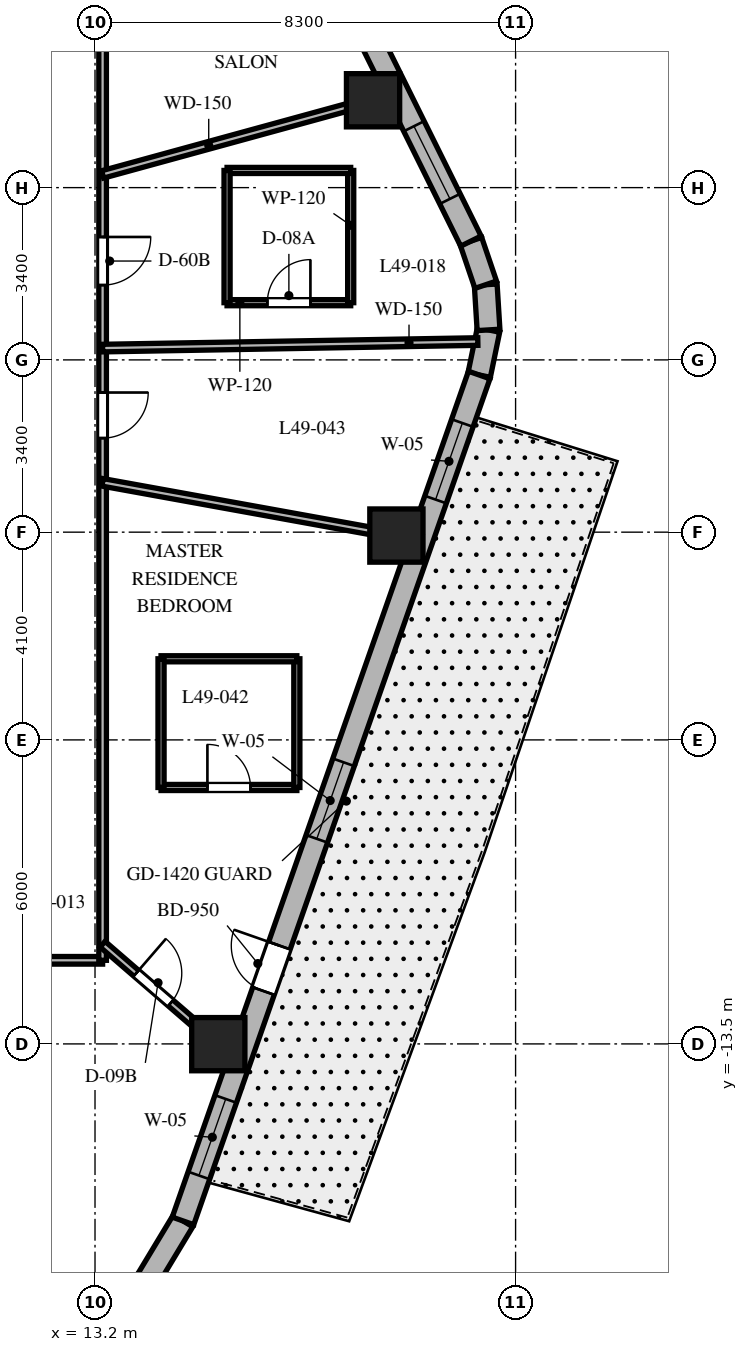
"""IFC4 building model, lengths in metres.
Left out: names, types, materials, properties, quantities, classifications, styles, units other than length and angle.
Written with IfcOpenShell. Run it as: python <this file> out.ifc"""

import sys

from ifc_helpers import new_model, si_unit, direction, frame, frame_2d, origin, origin_2d, place, context, subcontext, project, spatial, rectangle, extrude, element, fill, save


model = new_model("IFC4")
c1 = context("Model", 3, precision=1e-05, world=origin(), true_north=direction((0.0, 1.0)))
c2 = subcontext(c1, "Body", "Model", "MODEL_VIEW")
j1 = project(units=[si_unit("LENGTHUNIT", "METRE"), si_unit("PLANEANGLEUNIT", "RADIAN")], contexts=[c1])
p1 = place(None, origin())
s1 = spatial("IfcSite", under=j1, at=p1, CompositionType="ELEMENT")
p2 = place(p1, origin())
s2 = spatial("IfcBuilding", under=s1, at=p2, CompositionType="ELEMENT")
p3 = place(p2, frame((0.0, 0.0, 197.8)))
s3 = spatial("IfcBuildingStorey", under=s2, at=p3, CompositionType="ELEMENT", Elevation=197.8)
for number, where, z_axis, x_axis in (
    (1, (15.633, -13.505, 0.0), (0.0, 0.0, 1.0), (1.0, 0.0, 0.0)),
    (2, (19.148, -3.467, 0.0), (0.0, 0.0, 1.0), (1.0, 0.0, 0.0)),
    (3, (18.687, 5.124, 0.0), (0.0, 0.0, 1.0), (1.0, 0.0, 0.0)),
):
    element("IfcColumn", number, at=place(p3, frame(where, z_axis=z_axis, x_axis=x_axis)), inside=s3, PredefinedType="COLUMN", context=c2, shape_type="SweptSolid", body=[
        extrude(rectangle(XDim=1.05, YDim=1.05, at=origin_2d()), origin(), (0.0, 0.0, 1.0), 3.7),
    ])
p4 = place(p3, frame((14.214, -18.192, 0.0), z_axis=(0.0, 0.0, 1.0), x_axis=(0.516340945502, 0.856383108193, 0.0)))
e4 = element("IfcWall", 4, at=p4, inside=s3, PredefinedType="SOLIDWALL", context=c2, shape_type="SweptSolid", body=[
    extrude(rectangle(XDim=1.4, YDim=0.45, at=frame_2d((0.7, 0.0))), origin(), (0.0, 0.0, 1.0), 3.35),
])
p5 = place(p3, frame((20.782, -0.298, 0.0), z_axis=(0.0, 0.0, 1.0), x_axis=(0.202570068411, 0.979267771033, 0.0)))
e5 = element("IfcWall", 5, at=p5, inside=s3, PredefinedType="SOLIDWALL", context=c2, shape_type="SweptSolid", body=[
    extrude(rectangle(XDim=0.909, YDim=0.45, at=frame_2d((0.454, 0.0))), origin(), (0.0, 0.0, 1.0), 3.35),
])
p6 = place(p3, frame((20.966, 0.592, 0.0), z_axis=(0.0, 0.0, 1.0), x_axis=(-0.061748898935, 0.998091715966, 0.0)))
e6 = element("IfcWall", 6, at=p6, inside=s3, PredefinedType="SOLIDWALL", context=c2, shape_type="SweptSolid", body=[
    extrude(rectangle(XDim=0.894, YDim=0.45, at=frame_2d((0.447, 0.0))), origin(), (0.0, 0.0, 1.0), 3.35),
])
p7 = place(p3, frame((20.911, 1.484, 0.0), z_axis=(0.0, 0.0, 1.0), x_axis=(-0.321623334353, 0.946867694453, 0.0)))
e7 = element("IfcWall", 7, at=p7, inside=s3, PredefinedType="SOLIDWALL", context=c2, shape_type="SweptSolid", body=[
    extrude(rectangle(XDim=0.909, YDim=0.45, at=frame_2d((0.454, 0.0))), origin(), (0.0, 0.0, 1.0), 3.35),
])
p8 = place(p3, frame((14.937, -16.993, 0.0), z_axis=(0.0, 0.0, 1.0), x_axis=(0.330431575061, 0.943829949834, 0.0)))
e8 = element("IfcWall", 8, at=p8, inside=s3, PredefinedType="SOLIDWALL", context=c2, shape_type="SweptSolid", body=[
    extrude(rectangle(XDim=17.689, YDim=0.45, at=frame_2d((8.844, 0.0))), origin(), (0.0, 0.0, 1.0), 3.35),
])
p9 = place(p8, frame((4.807, 0.0, 0.0)))
e9 = element("IfcOpeningElement", 9, at=p9, cuts=e8, PredefinedType="OPENING", context=c2, shape_type="SweptSolid", body=[
    extrude(rectangle(XDim=0.95, YDim=2.15, at=frame_2d((0.475, 1.075))), frame((0.0, 0.235, 0.0), z_axis=(0.0, -1.0, 0.0), x_axis=(1.0, 0.0, 0.0)), (0.0, 0.0, 1.0), 0.47),
])
p10 = place(p8, frame((0.95, 0.0, 0.8)))
e10 = element("IfcOpeningElement", 10, at=p10, cuts=e8, PredefinedType="OPENING", context=c2, shape_type="SweptSolid", body=[
    extrude(rectangle(XDim=1.6, YDim=1.75, at=frame_2d((0.8, 0.875))), frame((0.0, 0.235, 0.0), z_axis=(0.0, -1.0, 0.0), x_axis=(1.0, 0.0, 0.0)), (0.0, 0.0, 1.0), 0.47),
])
p11 = place(p8, frame((7.99, 0.0, 0.8)))
e11 = element("IfcOpeningElement", 11, at=p11, cuts=e8, PredefinedType="OPENING", context=c2, shape_type="SweptSolid", body=[
    extrude(rectangle(XDim=1.6, YDim=1.75, at=frame_2d((0.8, 0.875))), frame((0.0, 0.235, 0.0), z_axis=(0.0, -1.0, 0.0), x_axis=(1.0, 0.0, 0.0)), (0.0, 0.0, 1.0), 0.47),
])
p12 = place(p8, frame((15.084, 0.0, 0.8)))
e12 = element("IfcOpeningElement", 12, at=p12, cuts=e8, PredefinedType="OPENING", context=c2, shape_type="SweptSolid", body=[
    extrude(rectangle(XDim=1.6, YDim=1.75, at=frame_2d((0.8, 0.875))), frame((0.0, 0.235, 0.0), z_axis=(0.0, -1.0, 0.0), x_axis=(1.0, 0.0, 0.0)), (0.0, 0.0, 1.0), 0.47),
])
p13 = place(p3, frame((20.618, 2.344, 0.0), z_axis=(0.0, 0.0, 1.0), x_axis=(-0.444243691097, 0.895905990002, 0.0)))
e13 = element("IfcWall", 13, at=p13, inside=s3, PredefinedType="SOLIDWALL", context=c2, shape_type="SweptSolid", body=[
    extrude(rectangle(XDim=16.784, YDim=0.45, at=frame_2d((8.392, 0.0))), origin(), (0.0, 0.0, 1.0), 3.35),
])
p14 = place(p13, frame((0.931, 0.0, 0.8)))
e14 = element("IfcOpeningElement", 14, at=p14, cuts=e13, PredefinedType="OPENING", context=c2, shape_type="SweptSolid", body=[
    extrude(rectangle(XDim=1.6, YDim=1.75, at=frame_2d((0.8, 0.875))), frame((0.0, 0.235, 0.0), z_axis=(0.0, -1.0, 0.0), x_axis=(1.0, 0.0, 0.0)), (0.0, 0.0, 1.0), 0.47),
])
p15 = place(p13, frame((7.642, 0.0, 0.8)))
e15 = element("IfcOpeningElement", 15, at=p15, cuts=e13, PredefinedType="OPENING", context=c2, shape_type="SweptSolid", body=[
    extrude(rectangle(XDim=1.6, YDim=1.75, at=frame_2d((0.8, 0.875))), frame((0.0, 0.235, 0.0), z_axis=(0.0, -1.0, 0.0), x_axis=(1.0, 0.0, 0.0)), (0.0, 0.0, 1.0), 0.47),
])
p16 = place(p13, frame((14.303, 0.0, 0.8)))
e16 = element("IfcOpeningElement", 16, at=p16, cuts=e13, PredefinedType="OPENING", context=c2, shape_type="SweptSolid", body=[
    extrude(rectangle(XDim=1.6, YDim=1.75, at=frame_2d((0.8, 0.875))), frame((0.0, 0.235, 0.0), z_axis=(0.0, -1.0, 0.0), x_axis=(1.0, 0.0, 0.0)), (0.0, 0.0, 1.0), 0.47),
])
p17 = place(p3, frame((13.35, -11.85, 0.0), z_axis=(0.0, 0.0, 1.0), x_axis=(-1.0, 0.0, 0.0)))
e17 = element("IfcWall", 17, at=p17, inside=s3, PredefinedType="PARTITIONING", context=c2, shape_type="SweptSolid", body=[
    extrude(rectangle(XDim=26.7, YDim=0.15, at=frame_2d((13.35, 0.0))), origin(), (0.0, 0.0, 1.0), 2.14),
])
p18 = place(p17, frame((20.682, 0.0, 0.0)))
e18 = element("IfcOpeningElement", 18, at=p18, cuts=e17, PredefinedType="OPENING", context=c2, shape_type="SweptSolid", body=[
    extrude(rectangle(XDim=0.95, YDim=2.03, at=frame_2d((0.475, 1.015))), frame((0.0, 0.085, 0.0), z_axis=(0.0, -1.0, 0.0), x_axis=(1.0, 0.0, 0.0)), (0.0, 0.0, 1.0), 0.17),
])
p19 = place(p17, frame((14.708, 0.0, 0.0)))
e19 = element("IfcOpeningElement", 19, at=p19, cuts=e17, PredefinedType="OPENING", context=c2, shape_type="SweptSolid", body=[
    extrude(rectangle(XDim=0.95, YDim=2.03, at=frame_2d((0.475, 1.015))), frame((0.0, 0.085, 0.0), z_axis=(0.0, -1.0, 0.0), x_axis=(1.0, 0.0, 0.0)), (0.0, 0.0, 1.0), 0.17),
])
p20 = place(p17, frame((10.553, 0.0, 0.0)))
e20 = element("IfcOpeningElement", 20, at=p20, cuts=e17, PredefinedType="OPENING", context=c2, shape_type="SweptSolid", body=[
    extrude(rectangle(XDim=0.95, YDim=2.03, at=frame_2d((0.475, 1.015))), frame((0.0, 0.085, 0.0), z_axis=(0.0, -1.0, 0.0), x_axis=(1.0, 0.0, 0.0)), (0.0, 0.0, 1.0), 0.17),
])
p21 = place(p17, frame((3.97, 0.0, 0.0)))
e21 = element("IfcOpeningElement", 21, at=p21, cuts=e17, PredefinedType="OPENING", context=c2, shape_type="SweptSolid", body=[
    extrude(rectangle(XDim=1.0, YDim=2.03, at=frame_2d((0.5, 1.015))), frame((0.0, 0.085, 0.0), z_axis=(0.0, -1.0, 0.0), x_axis=(1.0, 0.0, 0.0)), (0.0, 0.0, 1.0), 0.17),
])
p22 = place(p3, frame((13.35, 11.85, 0.0), z_axis=(0.0, 0.0, 1.0), x_axis=(0.0, -1.0, 0.0)))
e22 = element("IfcWall", 22, at=p22, inside=s3, PredefinedType="PARTITIONING", context=c2, shape_type="SweptSolid", body=[
    extrude(rectangle(XDim=23.7, YDim=0.15, at=frame_2d((11.85, 0.0))), origin(), (0.0, 0.0, 1.0), 2.79),
])
p23 = place(p22, frame((9.424, 0.0, 0.0)))
e23 = element("IfcOpeningElement", 23, at=p23, cuts=e22, PredefinedType="OPENING", context=c2, shape_type="SweptSolid", body=[
    extrude(rectangle(XDim=0.95, YDim=2.03, at=frame_2d((0.475, 1.015))), frame((0.0, 0.085, 0.0), z_axis=(0.0, -1.0, 0.0), x_axis=(1.0, 0.0, 0.0)), (0.0, 0.0, 1.0), 0.17),
])
p24 = place(p22, frame((3.765, 0.0, 0.0)))
e24 = element("IfcOpeningElement", 24, at=p24, cuts=e22, PredefinedType="OPENING", context=c2, shape_type="SweptSolid", body=[
    extrude(rectangle(XDim=0.9, YDim=2.03, at=frame_2d((0.45, 1.015))), frame((0.0, 0.085, 0.0), z_axis=(0.0, -1.0, 0.0), x_axis=(1.0, 0.0, 0.0)), (0.0, 0.0, 1.0), 0.17),
])
p25 = place(p22, frame((12.494, 0.0, 0.0)))
e25 = element("IfcOpeningElement", 25, at=p25, cuts=e22, PredefinedType="OPENING", context=c2, shape_type="SweptSolid", body=[
    extrude(rectangle(XDim=0.9, YDim=2.03, at=frame_2d((0.45, 1.015))), frame((0.0, 0.085, 0.0), z_axis=(0.0, -1.0, 0.0), x_axis=(1.0, 0.0, 0.0)), (0.0, 0.0, 1.0), 0.17),
])
p26 = place(p3, frame((13.35, 0.233, 0.0), z_axis=(0.0, 0.0, 1.0), x_axis=(0.999847932133, 0.017438824797, 0.0)))
e26 = element("IfcWall", 26, at=p26, inside=s3, PredefinedType="PARTITIONING", context=c2, shape_type="SweptSolid", body=[
    extrude(rectangle(XDim=7.406, YDim=0.15, at=frame_2d((3.703, 0.0))), origin(), (0.0, 0.0, 1.0), 2.59),
])
p27 = place(p3, frame((13.35, 3.661, 0.0), z_axis=(0.0, 0.0, 1.0), x_axis=(0.964397145454, 0.264458211898, 0.0)))
e27 = element("IfcWall", 27, at=p27, inside=s3, PredefinedType="PARTITIONING", context=c2, shape_type="SweptSolid", body=[
    extrude(rectangle(XDim=6.039, YDim=0.15, at=frame_2d((3.019, 0.0))), origin(), (0.0, 0.0, 1.0), 2.59),
])
p28 = place(p3, frame((13.35, -11.533, 0.0), z_axis=(0.0, 0.0, 1.0), x_axis=(0.756711647314, -0.65374879183, 0.0)))
e28 = element("IfcWall", 28, at=p28, inside=s3, PredefinedType="PARTITIONING", context=c2, shape_type="SweptSolid", body=[
    extrude(rectangle(XDim=3.55, YDim=0.15, at=frame_2d((1.775, 0.0))), origin(), (0.0, 0.0, 1.0), 2.59),
])
p29 = place(p28, frame((0.875, 0.0, 0.0)))
e29 = element("IfcOpeningElement", 29, at=p29, cuts=e28, PredefinedType="OPENING", context=c2, shape_type="SweptSolid", body=[
    extrude(rectangle(XDim=0.9, YDim=2.03, at=frame_2d((0.45, 1.015))), frame((0.0, 0.085, 0.0), z_axis=(0.0, -1.0, 0.0), x_axis=(1.0, 0.0, 0.0)), (0.0, 0.0, 1.0), 0.17),
])
p30 = place(p3, frame((13.35, -2.417, 0.0), z_axis=(0.0, 0.0, 1.0), x_axis=(0.98399796473, -0.178179699761, 0.0)))
e30 = element("IfcWall", 30, at=p30, inside=s3, PredefinedType="PARTITIONING", context=c2, shape_type="SweptSolid", body=[
    extrude(rectangle(XDim=6.393, YDim=0.15, at=frame_2d((3.197, 0.0))), origin(), (0.0, 0.0, 1.0), 2.59),
])
p31 = place(p3, frame((15.806, 1.129, 0.0), z_axis=(0.0, 0.0, 1.0), x_axis=(1.0, 0.0, 0.0)))
e31 = element("IfcWall", 31, at=p31, inside=s3, PredefinedType="PARTITIONING", context=c2, shape_type="SweptSolid", body=[
    extrude(rectangle(XDim=2.44, YDim=0.12, at=frame_2d((1.22, 0.0))), origin(), (0.0, 0.0, 1.0), 3.35),
])
p32 = place(p31, frame((0.795, 0.0, 0.0)))
e32 = element("IfcOpeningElement", 32, at=p32, cuts=e31, PredefinedType="OPENING", context=c2, shape_type="SweptSolid", body=[
    extrude(rectangle(XDim=0.85, YDim=2.03, at=frame_2d((0.425, 1.015))), frame((0.0, 0.07, 0.0), z_axis=(0.0, -1.0, 0.0), x_axis=(1.0, 0.0, 0.0)), (0.0, 0.0, 1.0), 0.14),
])
p33 = place(p3, frame((18.246, 1.129, 0.0), z_axis=(0.0, 0.0, 1.0), x_axis=(0.0, 1.0, 0.0)))
e33 = element("IfcWall", 33, at=p33, inside=s3, PredefinedType="PARTITIONING", context=c2, shape_type="SweptSolid", body=[
    extrude(rectangle(XDim=2.61, YDim=0.12, at=frame_2d((1.305, 0.0))), origin(), (0.0, 0.0, 1.0), 3.35),
])
p34 = place(p3, frame((18.246, 3.739, 0.0), z_axis=(0.0, 0.0, 1.0), x_axis=(-1.0, 0.0, 0.0)))
e34 = element("IfcWall", 34, at=p34, inside=s3, PredefinedType="PARTITIONING", context=c2, shape_type="SweptSolid", body=[
    extrude(rectangle(XDim=2.44, YDim=0.12, at=frame_2d((1.22, 0.0))), origin(), (0.0, 0.0, 1.0), 3.35),
])
p35 = place(p3, frame((15.806, 3.739, 0.0), z_axis=(0.0, 0.0, 1.0), x_axis=(0.0, -1.0, 0.0)))
e35 = element("IfcWall", 35, at=p35, inside=s3, PredefinedType="PARTITIONING", context=c2, shape_type="SweptSolid", body=[
    extrude(rectangle(XDim=2.61, YDim=0.12, at=frame_2d((1.305, 0.0))), origin(), (0.0, 0.0, 1.0), 2.791),
])
p36 = place(p3, frame((14.503, -8.439, 0.0), z_axis=(0.0, 0.0, 1.0), x_axis=(1.0, 0.0, 0.0)))
e36 = element("IfcWall", 36, at=p36, inside=s3, PredefinedType="PARTITIONING", context=c2, shape_type="SweptSolid", body=[
    extrude(rectangle(XDim=2.68, YDim=0.12, at=frame_2d((1.34, 0.0))), origin(), (0.0, 0.0, 1.0), 2.922),
])
p37 = place(p36, frame((0.915, 0.0, 0.0)))
e37 = element("IfcOpeningElement", 37, at=p37, cuts=e36, PredefinedType="OPENING", context=c2, shape_type="SweptSolid", body=[
    extrude(rectangle(XDim=0.85, YDim=2.03, at=frame_2d((0.425, 1.015))), frame((0.0, 0.07, 0.0), z_axis=(0.0, -1.0, 0.0), x_axis=(1.0, 0.0, 0.0)), (0.0, 0.0, 1.0), 0.14),
])
p38 = place(p3, frame((17.183, -8.439, 0.0), z_axis=(0.0, 0.0, 1.0), x_axis=(0.0, 1.0, 0.0)))
e38 = element("IfcWall", 38, at=p38, inside=s3, PredefinedType="PARTITIONING", context=c2, shape_type="SweptSolid", body=[
    extrude(rectangle(XDim=2.54, YDim=0.12, at=frame_2d((1.27, 0.0))), origin(), (0.0, 0.0, 1.0), 2.59),
])
p39 = place(p3, frame((17.183, -5.899, 0.0), z_axis=(0.0, 0.0, 1.0), x_axis=(-1.0, 0.0, 0.0)))
e39 = element("IfcWall", 39, at=p39, inside=s3, PredefinedType="PARTITIONING", context=c2, shape_type="SweptSolid", body=[
    extrude(rectangle(XDim=2.68, YDim=0.12, at=frame_2d((1.34, 0.0))), origin(), (0.0, 0.0, 1.0), 2.922),
])
p40 = place(p3, frame((14.503, -5.899, 0.0), z_axis=(0.0, 0.0, 1.0), x_axis=(0.0, -1.0, 0.0)))
e40 = element("IfcWall", 40, at=p40, inside=s3, PredefinedType="PARTITIONING", context=c2, shape_type="SweptSolid", body=[
    extrude(rectangle(XDim=2.54, YDim=0.12, at=frame_2d((1.27, 0.0))), origin(), (0.0, 0.0, 1.0), 3.35),
])
p41 = place(p9, origin())
e41 = element("IfcDoor", 41, at=p41, inside=s3, OperationType="SINGLE_SWING_RIGHT", PredefinedType="DOOR", context=c2, shape_type="SweptSolid", body=[
    extrude(rectangle(XDim=0.95, YDim=2.15, at=frame_2d((0.475, 1.075))), frame((0.0, 0.025, 0.0), z_axis=(0.0, -1.0, 0.0), x_axis=(1.0, 0.0, 0.0)), (0.0, 0.0, 1.0), 0.05),
])
fill(e9, e41)
p42 = place(p10, origin())
e42 = element("IfcWindow", 42, at=p42, inside=s3, PartitioningType="SINGLE_PANEL", PredefinedType="WINDOW", context=c2, shape_type="SweptSolid", body=[
    extrude(rectangle(XDim=1.6, YDim=1.75, at=frame_2d((0.8, 0.875))), frame((0.0, 0.03, 0.0), z_axis=(0.0, -1.0, 0.0), x_axis=(1.0, 0.0, 0.0)), (0.0, 0.0, 1.0), 0.06),
])
fill(e10, e42)
p43 = place(p11, origin())
e43 = element("IfcWindow", 43, at=p43, inside=s3, PartitioningType="SINGLE_PANEL", PredefinedType="WINDOW", context=c2, shape_type="SweptSolid", body=[
    extrude(rectangle(XDim=1.6, YDim=1.75, at=frame_2d((0.8, 0.875))), frame((0.0, 0.03, 0.0), z_axis=(0.0, -1.0, 0.0), x_axis=(1.0, 0.0, 0.0)), (0.0, 0.0, 1.0), 0.06),
])
fill(e11, e43)
p44 = place(p12, origin())
e44 = element("IfcWindow", 44, at=p44, inside=s3, PartitioningType="SINGLE_PANEL", PredefinedType="WINDOW", context=c2, shape_type="SweptSolid", body=[
    extrude(rectangle(XDim=1.6, YDim=1.75, at=frame_2d((0.8, 0.875))), frame((0.0, 0.03, 0.0), z_axis=(0.0, -1.0, 0.0), x_axis=(1.0, 0.0, 0.0)), (0.0, 0.0, 1.0), 0.06),
])
fill(e12, e44)
p45 = place(p14, origin())
e45 = element("IfcWindow", 45, at=p45, inside=s3, PartitioningType="SINGLE_PANEL", PredefinedType="WINDOW", context=c2, shape_type="SweptSolid", body=[
    extrude(rectangle(XDim=1.6, YDim=1.75, at=frame_2d((0.8, 0.875))), frame((0.0, 0.03, 0.0), z_axis=(0.0, -1.0, 0.0), x_axis=(1.0, 0.0, 0.0)), (0.0, 0.0, 1.0), 0.06),
])
fill(e14, e45)
p46 = place(p23, origin())
e46 = element("IfcDoor", 46, at=p46, inside=s3, OperationType="SINGLE_SWING_LEFT", PredefinedType="DOOR", context=c2, shape_type="SweptSolid", body=[
    extrude(rectangle(XDim=0.95, YDim=2.03, at=frame_2d((0.475, 1.015))), frame((0.0, 0.025, 0.0), z_axis=(0.0, -1.0, 0.0), x_axis=(1.0, 0.0, 0.0)), (0.0, 0.0, 1.0), 0.05),
])
fill(e23, e46)
p47 = place(p32, origin())
e47 = element("IfcDoor", 47, at=p47, inside=s3, OperationType="SINGLE_SWING_RIGHT", PredefinedType="DOOR", context=c2, shape_type="SweptSolid", body=[
    extrude(rectangle(XDim=0.85, YDim=2.03, at=frame_2d((0.425, 1.015))), frame((0.0, 0.025, 0.0), z_axis=(0.0, -1.0, 0.0), x_axis=(1.0, 0.0, 0.0)), (0.0, 0.0, 1.0), 0.05),
])
fill(e32, e47)
p48 = place(p29, origin())
e48 = element("IfcDoor", 48, at=p48, inside=s3, OperationType="SINGLE_SWING_LEFT", PredefinedType="DOOR", context=c2, shape_type="SweptSolid", body=[
    extrude(rectangle(XDim=0.9, YDim=2.03, at=frame_2d((0.45, 1.015))), frame((0.0, 0.025, 0.0), z_axis=(0.0, -1.0, 0.0), x_axis=(1.0, 0.0, 0.0)), (0.0, 0.0, 1.0), 0.05),
])
fill(e29, e48)
p49 = place(p37, origin())
e49 = element("IfcDoor", 49, at=p49, inside=s3, OperationType="SINGLE_SWING_LEFT", PredefinedType="DOOR", context=c2, shape_type="SweptSolid", body=[
    extrude(rectangle(XDim=0.85, YDim=2.03, at=frame_2d((0.425, 1.015))), frame((0.0, 0.025, 0.0), z_axis=(0.0, -1.0, 0.0), x_axis=(1.0, 0.0, 0.0)), (0.0, 0.0, 1.0), 0.05),
])
fill(e37, e49)
p50 = place(p25, origin())
e50 = element("IfcDoor", 50, at=p50, inside=s3, OperationType="SINGLE_SWING_LEFT", PredefinedType="DOOR", context=c2, shape_type="SweptSolid", body=[
    extrude(rectangle(XDim=0.9, YDim=2.03, at=frame_2d((0.45, 1.015))), frame((0.0, 0.025, 0.0), z_axis=(0.0, -1.0, 0.0), x_axis=(1.0, 0.0, 0.0)), (0.0, 0.0, 1.0), 0.05),
])
fill(e25, e50)
save(model, sys.argv[1])
